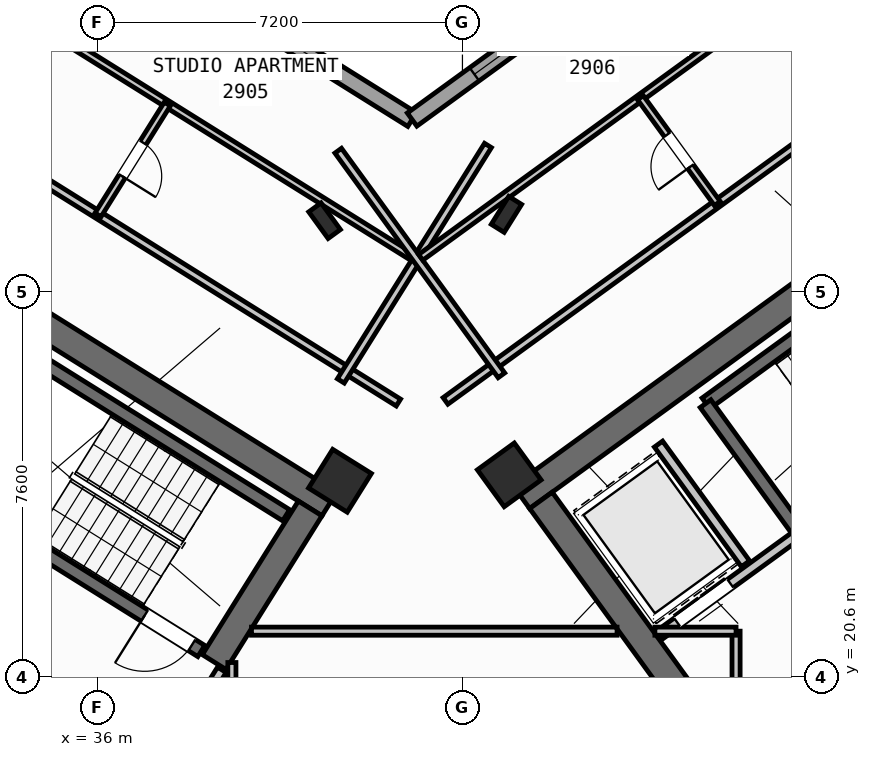
"""IFC4 building model, lengths in metres.
Left out: names, types, materials, properties, quantities, classifications, styles, units other than length and angle.
Written with IfcOpenShell. Run it as: python <this file> out.ifc"""

import sys

from ifc_helpers import new_model, si_unit, direction, frame, frame_2d, origin, origin_2d, place, context, subcontext, project, spatial, rectangle, hollow_rectangle, i_section, extrude, source, transform, mapped, element, fill, save


model = new_model("IFC4")
c1 = context("Model", 3, precision=1e-05, world=origin(), true_north=direction((0.0, 1.0)))
c2 = subcontext(c1, "Body", "Model", "MODEL_VIEW")
j1 = project(units=[si_unit("LENGTHUNIT", "METRE"), si_unit("PLANEANGLEUNIT", "RADIAN")], contexts=[c1])
p1 = place(None, origin())
s1 = spatial("IfcSite", under=j1, at=p1, CompositionType="ELEMENT")
p2 = place(p1, origin())
s2 = spatial("IfcBuilding", under=s1, at=p2, CompositionType="ELEMENT")
p3 = place(p2, frame((0.0, 0.0, 116.1)))
s3 = spatial("IfcBuildingStorey", under=s2, at=p3, CompositionType="ELEMENT", Elevation=116.1)
p4 = place(p3, frame((40.573, 24.01, 0.0), z_axis=(0.0, 0.0, 1.0), x_axis=(-0.848047359947, 0.529920442413, 0.0)))
e1 = element("IfcWall", 1, at=p4, inside=s3, PredefinedType="SHEAR", context=c2, shape_type="SweptSolid", body=[
    extrude(rectangle(XDim=13.14, YDim=0.55, at=frame_2d((6.57, 0.0))), origin(), (0.0, 0.0, 1.0), 3.35),
])
p5 = place(p3, frame((40.194, 23.922, 0.0), z_axis=(0.0, 0.0, 1.0), x_axis=(-0.529888438328, -0.848067357541, 0.0)))
e2 = element("IfcWall", 2, at=p5, inside=s3, PredefinedType="SHEAR", context=c2, shape_type="SweptSolid", body=[
    extrude(rectangle(XDim=3.575, YDim=0.55, at=frame_2d((1.788, 0.0))), origin(), (0.0, 0.0, 1.0), 3.35),
])
p6 = place(p3, frame((44.365, 24.142, 0.0), z_axis=(0.0, 0.0, 1.0), x_axis=(0.809024304885, 0.587775190107, 0.0)))
e3 = element("IfcWall", 3, at=p6, inside=s3, PredefinedType="SHEAR", context=c2, shape_type="SweptSolid", body=[
    extrude(rectangle(XDim=12.34, YDim=0.55, at=frame_2d((6.17, 0.0))), origin(), (0.0, 0.0, 1.0), 3.35),
])
p7 = place(p3, frame((48.526, 18.884, 0.0), z_axis=(0.0, 0.0, 1.0), x_axis=(-0.587764933797, 0.809031756236, 0.0)))
e4 = element("IfcWall", 4, at=p7, inside=s3, PredefinedType="SHEAR", context=c2, shape_type="SweptSolid", body=[
    extrude(rectangle(XDim=6.425, YDim=0.55, at=frame_2d((3.212, 0.0))), origin(), (0.0, 0.0, 1.0), 3.35),
])
m1 = source(origin(), c2, "Body", "SweptSolid", [
    extrude(i_section(OverallWidth=0.3, OverallDepth=0.65, WebThickness=0.016, FlangeThickness=0.031, at=origin_2d()), origin(), (0.0, 0.0, 1.0), 3.6),
])
p8 = place(p3, frame((44.068, 29.726, 0.0), z_axis=(0.0, 0.0, 1.0), x_axis=(-0.848048096156, 0.529919264233, 0.0)))
e5 = element("IfcColumn", 5, at=p8, inside=s3, PredefinedType="COLUMN", context=c2, shape_type="MappedRepresentation", body=[
    mapped(m1, transform((0.0, 0.0, 0.0), scale=1.0)),
])
m2 = source(origin(), c2, "Body", "SweptSolid", [
    extrude(hollow_rectangle(XDim=0.9, YDim=0.9, WallThickness=0.036, at=origin_2d()), origin(), (0.0, 0.0, 1.0), 3.6),
])
for number, where, z_axis, x_axis in (
    (6, (40.783, 24.469, 0.0), (0.0, 0.0, 1.0), (-0.848, 0.53, 0.0)),
    (7, (44.124, 24.585, 0.0), (0.0, 0.0, 1.0), (0.809, 0.588, 0.0)),
):
    element("IfcColumn", number, at=place(p3, frame(where, z_axis=z_axis, x_axis=x_axis)), inside=s3, PredefinedType="COLUMN", context=c2, shape_type="MappedRepresentation", body=[
        mapped(m2, transform((0.0, 0.0, 0.0), scale=1.0)),
    ])
p9 = place(p3, frame((40.479, 29.601, 0.0), z_axis=(0.0, 0.0, 1.0), x_axis=(0.809016994375, 0.587785252292, 0.0)))
e8 = element("IfcColumn", 8, at=p9, inside=s3, PredefinedType="COLUMN", context=c2, shape_type="MappedRepresentation", body=[
    mapped(m1, transform((0.0, 0.0, 0.0), scale=1.0)),
])
p10 = place(p3, frame((17.424, 47.083, 0.0), z_axis=(0.0, 0.0, 1.0), x_axis=(0.848049927979, -0.529916332693, 0.0)))
e9 = element("IfcWall", 9, at=p10, inside=s3, PredefinedType="STANDARD", context=c2, shape_type="SweptSolid", body=[
    extrude(rectangle(XDim=29.223, YDim=0.32, at=frame_2d((14.612, 0.0))), origin(), (0.0, 0.0, 1.0), 3.35),
])
p11 = place(p10, frame((8.839, 0.0, 0.0)))
e10 = element("IfcOpeningElement", 10, at=p11, cuts=e9, PredefinedType="OPENING", context=c2, shape_type="SweptSolid", body=[
    extrude(rectangle(XDim=1.05, YDim=2.15, at=frame_2d((0.525, 1.075))), frame((0.0, 0.17, 0.0), z_axis=(0.0, -1.0, 0.0), x_axis=(1.0, 0.0, 0.0)), (0.0, 0.0, 1.0), 0.34),
])
p12 = place(p10, frame((0.719, 0.0, 0.85)))
e11 = element("IfcOpeningElement", 11, at=p12, cuts=e9, PredefinedType="OPENING", context=c2, shape_type="SweptSolid", body=[
    extrude(rectangle(XDim=1.8, YDim=1.5, at=frame_2d((0.9, 0.75))), frame((0.0, 0.17, 0.0), z_axis=(0.0, -1.0, 0.0), x_axis=(1.0, 0.0, 0.0)), (0.0, 0.0, 1.0), 0.34),
])
p13 = place(p10, frame((3.981, 0.0, 0.85)))
e12 = element("IfcOpeningElement", 12, at=p13, cuts=e9, PredefinedType="OPENING", context=c2, shape_type="SweptSolid", body=[
    extrude(rectangle(XDim=1.5, YDim=1.5, at=frame_2d((0.75, 0.75))), frame((0.0, 0.17, 0.0), z_axis=(0.0, -1.0, 0.0), x_axis=(1.0, 0.0, 0.0)), (0.0, 0.0, 1.0), 0.34),
])
p14 = place(p10, frame((7.021, 0.0, 0.95)))
e13 = element("IfcOpeningElement", 13, at=p14, cuts=e9, PredefinedType="OPENING", context=c2, shape_type="SweptSolid", body=[
    extrude(rectangle(XDim=1.2, YDim=1.4, at=frame_2d((0.6, 0.7))), frame((0.0, 0.17, 0.0), z_axis=(0.0, -1.0, 0.0), x_axis=(1.0, 0.0, 0.0)), (0.0, 0.0, 1.0), 0.34),
])
p15 = place(p10, frame((14.471, 0.0, 0.95)))
e14 = element("IfcOpeningElement", 14, at=p15, cuts=e9, PredefinedType="OPENING", context=c2, shape_type="SweptSolid", body=[
    extrude(rectangle(XDim=1.2, YDim=1.4, at=frame_2d((0.6, 0.7))), frame((0.0, 0.17, 0.0), z_axis=(0.0, -1.0, 0.0), x_axis=(1.0, 0.0, 0.0)), (0.0, 0.0, 1.0), 0.34),
])
p16 = place(p10, frame((17.254, 0.0, 1.0)))
e15 = element("IfcOpeningElement", 15, at=p16, cuts=e9, PredefinedType="OPENING", context=c2, shape_type="SweptSolid", body=[
    extrude(rectangle(XDim=0.9, YDim=1.25, at=frame_2d((0.45, 0.625))), frame((0.0, 0.17, 0.0), z_axis=(0.0, -1.0, 0.0), x_axis=(1.0, 0.0, 0.0)), (0.0, 0.0, 1.0), 0.34),
])
p17 = place(p10, frame((20.764, 0.0, 0.8)))
e16 = element("IfcOpeningElement", 16, at=p17, cuts=e9, PredefinedType="OPENING", context=c2, shape_type="SweptSolid", body=[
    extrude(rectangle(XDim=2.1, YDim=1.55, at=frame_2d((1.05, 0.775))), frame((0.0, 0.17, 0.0), z_axis=(0.0, -1.0, 0.0), x_axis=(1.0, 0.0, 0.0)), (0.0, 0.0, 1.0), 0.34),
])
p18 = place(p10, frame((25.403, 0.0, 0.8)))
e17 = element("IfcOpeningElement", 17, at=p18, cuts=e9, PredefinedType="OPENING", context=c2, shape_type="SweptSolid", body=[
    extrude(rectangle(XDim=2.1, YDim=1.55, at=frame_2d((1.05, 0.775))), frame((0.0, 0.17, 0.0), z_axis=(0.0, -1.0, 0.0), x_axis=(1.0, 0.0, 0.0)), (0.0, 0.0, 1.0), 0.34),
])
p19 = place(p3, frame((42.207, 31.597, 0.0), z_axis=(0.0, 0.0, 1.0), x_axis=(0.809020333377, 0.587780656523, 0.0)))
e18 = element("IfcWall", 18, at=p19, inside=s3, PredefinedType="STANDARD", context=c2, shape_type="SweptSolid", body=[
    extrude(rectangle(XDim=15.223, YDim=0.32, at=frame_2d((7.611, 0.0))), origin(), (0.0, 0.0, 1.0), 3.35),
])
p20 = place(p19, frame((12.82, 0.0, 0.0)))
e19 = element("IfcOpeningElement", 19, at=p20, cuts=e18, PredefinedType="OPENING", context=c2, shape_type="SweptSolid", body=[
    extrude(rectangle(XDim=1.05, YDim=2.15, at=frame_2d((0.525, 1.075))), frame((0.0, 0.17, 0.0), z_axis=(0.0, -1.0, 0.0), x_axis=(1.0, 0.0, 0.0)), (0.0, 0.0, 1.0), 0.34),
])
p21 = place(p19, frame((1.52, 0.0, 0.8)))
e20 = element("IfcOpeningElement", 20, at=p21, cuts=e18, PredefinedType="OPENING", context=c2, shape_type="SweptSolid", body=[
    extrude(rectangle(XDim=2.1, YDim=1.55, at=frame_2d((1.05, 0.775))), frame((0.0, 0.17, 0.0), z_axis=(0.0, -1.0, 0.0), x_axis=(1.0, 0.0, 0.0)), (0.0, 0.0, 1.0), 0.34),
])
p22 = place(p19, frame((5.76, 0.0, 0.8)))
e21 = element("IfcOpeningElement", 21, at=p22, cuts=e18, PredefinedType="OPENING", context=c2, shape_type="SweptSolid", body=[
    extrude(rectangle(XDim=2.1, YDim=1.55, at=frame_2d((1.05, 0.775))), frame((0.0, 0.17, 0.0), z_axis=(0.0, -1.0, 0.0), x_axis=(1.0, 0.0, 0.0)), (0.0, 0.0, 1.0), 0.34),
])
p23 = place(p19, frame((10.219, 0.0, 1.0)))
e22 = element("IfcOpeningElement", 22, at=p23, cuts=e18, PredefinedType="OPENING", context=c2, shape_type="SweptSolid", body=[
    extrude(rectangle(XDim=0.9, YDim=1.25, at=frame_2d((0.45, 0.625))), frame((0.0, 0.17, 0.0), z_axis=(0.0, -1.0, 0.0), x_axis=(1.0, 0.0, 0.0)), (0.0, 0.0, 1.0), 0.34),
])
p24 = place(p3, frame((39.721, 23.788, 0.0), z_axis=(0.0, 0.0, 1.0), x_axis=(-0.848054434086, 0.529909121291, 0.0)))
e23 = element("IfcWall", 23, at=p24, inside=s3, PredefinedType="SHEAR", context=c2, shape_type="SweptSolid", body=[
    extrude(rectangle(XDim=7.33, YDim=0.26, at=frame_2d((3.665, 0.0))), origin(), (0.0, 0.0, 1.0), 3.35),
])
p25 = place(p3, frame((38.046, 21.108, 0.0), z_axis=(0.0, 0.0, 1.0), x_axis=(-0.848054434086, 0.529909121291, 0.0)))
e24 = element("IfcWall", 24, at=p25, inside=s3, PredefinedType="SHEAR", context=c2, shape_type="SweptSolid", body=[
    extrude(rectangle(XDim=7.33, YDim=0.26, at=frame_2d((3.665, 0.0))), origin(), (0.0, 0.0, 1.0), 3.35),
])
p26 = place(p25, frame((0.22, 0.0, 0.0)))
e25 = element("IfcOpeningElement", 25, at=p26, cuts=e24, PredefinedType="OPENING", context=c2, shape_type="SweptSolid", body=[
    extrude(rectangle(XDim=1.1, YDim=2.1, at=frame_2d((0.55, 1.05))), frame((0.0, 0.14, 0.0), z_axis=(0.0, -1.0, 0.0), x_axis=(1.0, 0.0, 0.0)), (0.0, 0.0, 1.0), 0.28),
])
p27 = place(p3, frame((36.417, 18.447, 0.0), z_axis=(0.0, 0.0, 1.0), x_axis=(-0.848064879198, 0.529892404805, 0.0)))
e26 = element("IfcWall", 26, at=p27, inside=s3, PredefinedType="STANDARD", context=c2, shape_type="SweptSolid", body=[
    extrude(rectangle(XDim=5.768, YDim=0.2, at=frame_2d((2.884, 0.0))), origin(), (0.0, 0.0, 1.0), 3.34),
])
p28 = place(p27, frame((2.548, 0.0, 0.0)))
e27 = element("IfcOpeningElement", 27, at=p28, cuts=e26, PredefinedType="OPENING", context=c2, shape_type="SweptSolid", body=[
    extrude(rectangle(XDim=1.15, YDim=2.1, at=frame_2d((0.575, 1.05))), frame((0.0, 0.11, 0.0), z_axis=(0.0, -1.0, 0.0), x_axis=(1.0, 0.0, 0.0)), (0.0, 0.0, 1.0), 0.22),
])
p29 = place(p3, frame((48.006, 25.996, 0.0), z_axis=(0.0, 0.0, 1.0), x_axis=(0.80901903764, 0.587782439969, 0.0)))
e28 = element("IfcWall", 28, at=p29, inside=s3, PredefinedType="SHEAR", context=c2, shape_type="SweptSolid", body=[
    extrude(rectangle(XDim=7.46, YDim=0.26, at=frame_2d((3.73, 0.0))), origin(), (0.0, 0.0, 1.0), 3.35),
])
p30 = place(p3, frame((49.855, 23.434, 0.0), z_axis=(0.0, 0.0, 1.0), x_axis=(-0.58776738483, 0.809029975545, 0.0)))
e29 = element("IfcWall", 29, at=p30, inside=s3, PredefinedType="SHEAR", context=c2, shape_type="SweptSolid", body=[
    extrude(rectangle(XDim=3.16, YDim=0.26, at=frame_2d((1.58, 0.0))), origin(), (0.0, 0.0, 1.0), 3.35),
])
p31 = place(p3, frame((47.065, 21.407, 0.0), z_axis=(0.0, 0.0, 1.0), x_axis=(0.809032984992, 0.587763242466, 0.0)))
e30 = element("IfcWall", 30, at=p31, inside=s3, PredefinedType="STANDARD", context=c2, shape_type="SweptSolid", body=[
    extrude(rectangle(XDim=3.448, YDim=0.2, at=frame_2d((1.724, 0.0))), origin(), (0.0, 0.0, 1.0), 3.34),
])
p32 = place(p31, frame((0.458, 0.0, 0.0)))
e31 = element("IfcOpeningElement", 31, at=p32, cuts=e30, PredefinedType="OPENING", context=c2, shape_type="SweptSolid", body=[
    extrude(rectangle(XDim=1.3, YDim=2.2, at=frame_2d((0.65, 1.1))), frame((0.0, 0.11, 0.0), z_axis=(0.0, -1.0, 0.0), x_axis=(1.0, 0.0, 0.0)), (0.0, 0.0, 1.0), 0.22),
])
p33 = place(p3, frame((48.758, 19.077, 0.0), z_axis=(0.0, 0.0, 1.0), x_axis=(0.809005065155, 0.587801671104, 0.0)))
e32 = element("IfcWall", 32, at=p33, inside=s3, PredefinedType="STANDARD", context=c2, shape_type="SweptSolid", body=[
    extrude(rectangle(XDim=5.768, YDim=0.2, at=frame_2d((2.884, 0.0))), origin(), (0.0, 0.0, 1.0), 3.34),
])
p34 = place(p33, frame((2.548, 0.0, 0.0)))
e33 = element("IfcOpeningElement", 33, at=p34, cuts=e32, PredefinedType="OPENING", context=c2, shape_type="SweptSolid", body=[
    extrude(rectangle(XDim=1.15, YDim=2.1, at=frame_2d((0.575, 1.05))), frame((0.0, 0.11, 0.0), z_axis=(0.0, -1.0, 0.0), x_axis=(1.0, 0.0, 0.0)), (0.0, 0.0, 1.0), 0.22),
])
p35 = place(p3, frame((48.786, 22.83, 0.0), z_axis=(0.0, 0.0, 1.0), x_axis=(-0.587783856777, 0.809018008275, 0.0)))
e34 = element("IfcWall", 34, at=p35, inside=s3, PredefinedType="STANDARD", context=c2, shape_type="SweptSolid", body=[
    extrude(rectangle(XDim=2.92, YDim=0.2, at=frame_2d((1.46, 0.0))), origin(), (0.0, 0.0, 1.0), 3.34),
])
p36 = place(p3, frame((41.936, 26.012, 0.0), z_axis=(0.0, 0.0, 1.0), x_axis=(-0.848051154596, 0.529914369676, 0.0)))
e35 = element("IfcWall", 35, at=p36, inside=s3, PredefinedType="PARTITIONING", context=c2, shape_type="SweptSolid", body=[
    extrude(rectangle(XDim=15.57, YDim=0.16, at=frame_2d((7.785, 0.0))), origin(), (0.0, 0.0, 1.0), 3.34),
])
p37 = place(p36, frame((10.83, 0.0, 0.0)))
e36 = element("IfcOpeningElement", 36, at=p37, cuts=e35, PredefinedType="OPENING", context=c2, shape_type="SweptSolid", body=[
    extrude(rectangle(XDim=1.0, YDim=2.1, at=frame_2d((0.5, 1.05))), frame((0.0, 0.09, 0.0), z_axis=(0.0, -1.0, 0.0), x_axis=(1.0, 0.0, 0.0)), (0.0, 0.0, 1.0), 0.18),
])
p38 = place(p3, frame((43.704, 31.086, 0.0), z_axis=(0.0, 0.0, 1.0), x_axis=(-0.529906828443, -0.848055866774, 0.0)))
e37 = element("IfcWall", 37, at=p38, inside=s3, PredefinedType="PARTITIONING", context=c2, shape_type="SweptSolid", body=[
    extrude(rectangle(XDim=5.48, YDim=0.16, at=frame_2d((2.74, 0.0))), origin(), (0.0, 0.0, 1.0), 3.34),
])
p39 = place(p3, frame((42.226, 28.873, 0.0), z_axis=(0.0, 0.0, 1.0), x_axis=(-0.848049134363, 0.529917602752, 0.0)))
e38 = element("IfcWall", 38, at=p39, inside=s3, PredefinedType="PLUMBINGWALL", context=c2, shape_type="SweptSolid", body=[
    extrude(rectangle(XDim=14.3, YDim=0.14, at=frame_2d((7.15, 0.0))), origin(), (0.0, 0.0, 1.0), 3.34),
])
p40 = place(p39, frame((9.57, 0.0, 0.0)))
e39 = element("IfcOpeningElement", 39, at=p40, cuts=e38, PredefinedType="OPENING", context=c2, shape_type="SweptSolid", body=[
    extrude(rectangle(XDim=0.92, YDim=2.08, at=frame_2d((0.46, 1.04))), frame((0.0, 0.08, 0.0), z_axis=(0.0, -1.0, 0.0), x_axis=(1.0, 0.0, 0.0)), (0.0, 0.0, 1.0), 0.16),
])
p41 = place(p3, frame((37.375, 31.904, 0.0), z_axis=(0.0, 0.0, 1.0), x_axis=(-0.529913878929, -0.848051461244, 0.0)))
e40 = element("IfcWall", 40, at=p41, inside=s3, PredefinedType="PLUMBINGWALL", context=c2, shape_type="SweptSolid", body=[
    extrude(rectangle(XDim=2.58, YDim=0.14, at=frame_2d((1.29, 0.0))), origin(), (0.0, 0.0, 1.0), 3.34),
])
p42 = place(p41, frame((0.9, 0.0, 0.0)))
e41 = element("IfcOpeningElement", 41, at=p42, cuts=e40, PredefinedType="OPENING", context=c2, shape_type="SweptSolid", body=[
    extrude(rectangle(XDim=0.78, YDim=2.05, at=frame_2d((0.39, 1.025))), frame((0.0, 0.08, 0.0), z_axis=(0.0, -1.0, 0.0), x_axis=(1.0, 0.0, 0.0)), (0.0, 0.0, 1.0), 0.16),
])
p43 = place(p3, frame((38.451, 20.737, 0.0), z_axis=(0.0, 0.0, 1.0), x_axis=(-0.529924799939, -0.848044637038, 0.0)))
e42 = element("IfcWall", 42, at=p43, inside=s3, PredefinedType="STANDARD", context=c2, shape_type="SweptSolid", body=[
    extrude(rectangle(XDim=2.96, YDim=0.2, at=frame_2d((1.48, 0.0))), origin(), (0.0, 0.0, 1.0), 3.34),
])
p44 = place(p43, frame((1.46, 0.0, 0.0)))
e43 = element("IfcOpeningElement", 43, at=p44, cuts=e42, PredefinedType="OPENING", context=c2, shape_type="SweptSolid", body=[
    extrude(rectangle(XDim=0.86, YDim=2.05, at=frame_2d((0.43, 1.025))), frame((0.0, 0.11, 0.0), z_axis=(0.0, -1.0, 0.0), x_axis=(1.0, 0.0, 0.0)), (0.0, 0.0, 1.0), 0.22),
])
p45 = place(p3, frame((38.65, 17.93, 0.0), z_axis=(0.0, 0.0, 1.0), x_axis=(0.0, 1.0, 0.0)))
e44 = element("IfcWall", 44, at=p45, inside=s3, PredefinedType="PARTITIONING", context=c2, shape_type="SweptSolid", body=[
    extrude(rectangle(XDim=2.951, YDim=0.16, at=frame_2d((1.476, 0.0))), origin(), (0.0, 0.0, 1.0), 3.34),
])
p46 = place(p3, frame((48.6, 19.295, 0.0), z_axis=(0.0, 0.0, 1.0), x_axis=(0.0, 1.0, 0.0)))
e45 = element("IfcWall", 45, at=p46, inside=s3, PredefinedType="PARTITIONING", context=c2, shape_type="SweptSolid", body=[
    extrude(rectangle(XDim=2.205, YDim=0.16, at=frame_2d((1.103, 0.0))), origin(), (0.0, 0.0, 1.0), 3.34),
])
p47 = place(p3, frame((39.037, 21.5, 0.0), z_axis=(0.0, 0.0, 1.0), x_axis=(1.0, 0.0, 0.0)))
e46 = element("IfcWall", 46, at=p47, inside=s3, PredefinedType="PARTITIONING", context=c2, shape_type="SweptSolid", body=[
    extrude(rectangle(XDim=7.215, YDim=0.16, at=frame_2d((3.607, 0.0))), origin(), (0.0, 0.0, 1.0), 3.34),
])
p48 = place(p3, frame((46.998, 21.5, 0.0), z_axis=(0.0, 0.0, 1.0), x_axis=(1.0, 0.0, 0.0)))
e47 = element("IfcWall", 47, at=p48, inside=s3, PredefinedType="PARTITIONING", context=c2, shape_type="SweptSolid", body=[
    extrude(rectangle(XDim=1.602, YDim=0.16, at=frame_2d((0.801, 0.0))), origin(), (0.0, 0.0, 1.0), 3.34),
])
p49 = place(p3, frame((42.866, 26.044, 0.0), z_axis=(0.0, 0.0, 1.0), x_axis=(0.809020254154, 0.587780765566, 0.0)))
e48 = element("IfcWall", 48, at=p49, inside=s3, PredefinedType="PARTITIONING", context=c2, shape_type="SweptSolid", body=[
    extrude(rectangle(XDim=14.67, YDim=0.16, at=frame_2d((7.335, 0.0))), origin(), (0.0, 0.0, 1.0), 3.34),
])
p50 = place(p49, frame((10.2, 0.0, 0.0)))
e49 = element("IfcOpeningElement", 49, at=p50, cuts=e48, PredefinedType="OPENING", context=c2, shape_type="SweptSolid", body=[
    extrude(rectangle(XDim=1.0, YDim=2.1, at=frame_2d((0.5, 1.05))), frame((0.0, 0.09, 0.0), z_axis=(0.0, -1.0, 0.0), x_axis=(1.0, 0.0, 0.0)), (0.0, 0.0, 1.0), 0.18),
])
p51 = place(p3, frame((43.969, 26.55, 0.0), z_axis=(0.0, 0.0, 1.0), x_axis=(-0.587776919386, 0.80902304852, 0.0)))
e50 = element("IfcWall", 50, at=p51, inside=s3, PredefinedType="PARTITIONING", context=c2, shape_type="SweptSolid", body=[
    extrude(rectangle(XDim=5.48, YDim=0.16, at=frame_2d((2.74, 0.0))), origin(), (0.0, 0.0, 1.0), 3.34),
])
p52 = place(p3, frame((42.377, 28.878, 0.0), z_axis=(0.0, 0.0, 1.0), x_axis=(0.809020411523, 0.587780548963, 0.0)))
e51 = element("IfcWall", 51, at=p52, inside=s3, PredefinedType="PLUMBINGWALL", context=c2, shape_type="SweptSolid", body=[
    extrude(rectangle(XDim=13.4, YDim=0.14, at=frame_2d((6.7, 0.0))), origin(), (0.0, 0.0, 1.0), 3.34),
])
p53 = place(p52, frame((8.94, 0.0, 0.0)))
e52 = element("IfcOpeningElement", 52, at=p53, cuts=e51, PredefinedType="OPENING", context=c2, shape_type="SweptSolid", body=[
    extrude(rectangle(XDim=0.92, YDim=2.08, at=frame_2d((0.46, 1.04))), frame((0.0, 0.08, 0.0), z_axis=(0.0, -1.0, 0.0), x_axis=(1.0, 0.0, 0.0)), (0.0, 0.0, 1.0), 0.16),
])
p54 = place(p3, frame((48.229, 29.941, 0.0), z_axis=(0.0, 0.0, 1.0), x_axis=(-0.587772116736, 0.809026537752, 0.0)))
e53 = element("IfcWall", 53, at=p54, inside=s3, PredefinedType="PLUMBINGWALL", context=c2, shape_type="SweptSolid", body=[
    extrude(rectangle(XDim=2.58, YDim=0.14, at=frame_2d((1.29, 0.0))), origin(), (0.0, 0.0, 1.0), 3.34),
])
p55 = place(p54, frame((0.9, 0.0, 0.0)))
e54 = element("IfcOpeningElement", 54, at=p55, cuts=e53, PredefinedType="OPENING", context=c2, shape_type="SweptSolid", body=[
    extrude(rectangle(XDim=0.78, YDim=2.05, at=frame_2d((0.39, 1.025))), frame((0.0, 0.08, 0.0), z_axis=(0.0, -1.0, 0.0), x_axis=(1.0, 0.0, 0.0)), (0.0, 0.0, 1.0), 0.16),
])
m3 = source(origin(), c2, "Body", "SweptSolid", [
    extrude(rectangle(XDim=2.1, YDim=1.55, at=frame_2d((1.05, 0.775))), frame((0.0, 0.03, 0.0), z_axis=(0.0, -1.0, 0.0), x_axis=(1.0, 0.0, 0.0)), (0.0, 0.0, 1.0), 0.06),
])
p56 = place(p18, origin())
e55 = element("IfcWindow", 55, at=p56, inside=s3, PartitioningType="SINGLE_PANEL", PredefinedType="WINDOW", context=c2, shape_type="MappedRepresentation", body=[
    mapped(m3, transform((0.0, 0.0, 0.0), scale=1.0)),
])
fill(e17, e55)
p57 = place(p21, origin())
e56 = element("IfcWindow", 56, at=p57, inside=s3, PartitioningType="SINGLE_PANEL", PredefinedType="WINDOW", context=c2, shape_type="MappedRepresentation", body=[
    mapped(m3, transform((0.0, 0.0, 0.0), scale=1.0)),
])
fill(e20, e56)
m4 = source(origin(), c2, "Body", "SweptSolid", [
    extrude(rectangle(XDim=1.1, YDim=2.1, at=frame_2d((0.55, 1.05))), frame((0.0, 0.025, 0.0), z_axis=(0.0, -1.0, 0.0), x_axis=(1.0, 0.0, 0.0)), (0.0, 0.0, 1.0), 0.05),
])
p58 = place(p26, origin())
e57 = element("IfcDoor", 57, at=p58, inside=s3, OperationType="SINGLE_SWING_RIGHT", PredefinedType="DOOR", context=c2, shape_type="MappedRepresentation", body=[
    mapped(m4, transform((0.0, 0.0, 0.0), scale=1.0)),
])
fill(e25, e57)
m5 = source(origin(), c2, "Body", "SweptSolid", [
    extrude(rectangle(XDim=1.3, YDim=2.2, at=frame_2d((0.65, 1.1))), frame((0.0, 0.025, 0.0), z_axis=(0.0, -1.0, 0.0), x_axis=(1.0, 0.0, 0.0)), (0.0, 0.0, 1.0), 0.05),
])
p59 = place(p32, origin())
e58 = element("IfcDoor", 58, at=p59, inside=s3, OperationType="DOUBLE_DOOR_SLIDING", PredefinedType="DOOR", context=c2, shape_type="MappedRepresentation", body=[
    mapped(m5, transform((0.0, 0.0, 0.0), scale=1.0)),
])
fill(e31, e58)
m6 = source(origin(), c2, "Body", "SweptSolid", [
    extrude(rectangle(XDim=0.78, YDim=2.05, at=frame_2d((0.39, 1.025))), frame((0.0, 0.025, 0.0), z_axis=(0.0, -1.0, 0.0), x_axis=(1.0, 0.0, 0.0)), (0.0, 0.0, 1.0), 0.05),
])
p60 = place(p42, origin())
e59 = element("IfcDoor", 59, at=p60, inside=s3, OperationType="SINGLE_SWING_RIGHT", PredefinedType="DOOR", context=c2, shape_type="MappedRepresentation", body=[
    mapped(m6, transform((0.0, 0.0, 0.0), scale=1.0)),
])
fill(e41, e59)
p61 = place(p55, origin())
e60 = element("IfcDoor", 60, at=p61, inside=s3, OperationType="SINGLE_SWING_LEFT", PredefinedType="DOOR", context=c2, shape_type="MappedRepresentation", body=[
    mapped(m6, transform((0.0, 0.0, 0.0), scale=1.0)),
])
fill(e54, e60)
save(model, sys.argv[1])
